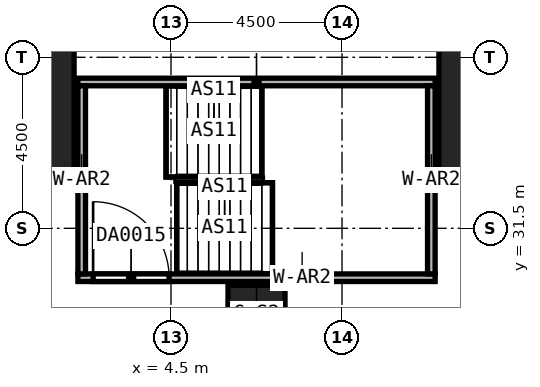
"""IFC4 building model, lengths in metres.
Left out: names, types, materials, properties, quantities, classifications, styles, units other than length and angle.
Written with IfcOpenShell. Run it as: python <this file> out.ifc"""

import sys

from ifc_helpers import new_model, si_unit, direction, frame, frame_2d, origin, origin_2d, place, context, subcontext, project, spatial, rectangle, extrude, element, fill, save


model = new_model("IFC4")
c1 = context("Model", 3, precision=1e-05, world=origin(), true_north=direction((0.0, 1.0)))
c2 = subcontext(c1, "Body", "Model", "MODEL_VIEW")
j1 = project(units=[si_unit("LENGTHUNIT", "METRE"), si_unit("PLANEANGLEUNIT", "RADIAN")], contexts=[c1])
p1 = place(None, origin())
s1 = spatial("IfcSite", under=j1, at=p1, CompositionType="ELEMENT")
p2 = place(p1, origin())
s2 = spatial("IfcBuilding", under=s1, at=p2, CompositionType="ELEMENT")
p3 = place(p2, frame((0.0, 0.0, 19.0)))
s3 = spatial("IfcBuildingStorey", under=s2, at=p3, CompositionType="ELEMENT", Elevation=19.0)
for number, where, z_axis, x_axis in (
    (1, (0.0, 35.85, 0.0), (0.0, 0.0, 1.0), (1.0, 0.0, 0.0)),
    (2, (13.5, 35.85, 0.0), (0.0, 0.0, 1.0), (1.0, 0.0, 0.0)),
):
    element("IfcColumn", number, at=place(p3, frame(where, z_axis=z_axis, x_axis=x_axis)), inside=s3, PredefinedType="COLUMN", context=c2, shape_type="SweptSolid", body=[
        extrude(rectangle(XDim=3.9, YDim=6.3, at=origin_2d()), origin(), (0.0, 0.0, 1.0), 6.0),
    ])
p4 = place(p3, frame((6.75, 29.25, 0.0), z_axis=(0.0, 0.0, 1.0), x_axis=(1.0, 0.0, 0.0)))
e3 = element("IfcColumn", 3, at=p4, inside=s3, PredefinedType="COLUMN", context=c2, shape_type="SweptSolid", body=[
    extrude(rectangle(XDim=1.5, YDim=1.5, at=origin_2d()), origin(), (0.0, 0.0, 1.0), 6.0),
])
p5 = place(p3, frame((2.05, 30.2, 0.0), z_axis=(0.0, 0.0, 1.0), x_axis=(1.0, 0.0, 0.0)))
e4 = element("IfcWall", 4, at=p5, inside=s3, PredefinedType="SOLIDWALL", context=c2, shape_type="SweptSolid", body=[
    extrude(rectangle(XDim=9.4, YDim=0.2, at=frame_2d((4.7, 0.0))), origin(), (0.0, 0.0, 1.0), 6.0),
])
p6 = place(p5, frame((0.4, 0.0, 0.0)))
e5 = element("IfcOpeningElement", 5, at=p6, cuts=e4, PredefinedType="OPENING", context=c2, shape_type="SweptSolid", body=[
    extrude(rectangle(XDim=2.0, YDim=2.4, at=frame_2d((1.0, 1.2))), frame((0.0, 0.1, 0.0), z_axis=(0.0, -1.0, 0.0), x_axis=(1.0, 0.0, 0.0)), (0.0, 0.0, 1.0), 0.2),
])
p7 = place(p3, frame((2.05, 35.35, 0.0), z_axis=(0.0, 0.0, 1.0), x_axis=(1.0, 0.0, 0.0)))
e6 = element("IfcWall", 6, at=p7, inside=s3, PredefinedType="SOLIDWALL", context=c2, shape_type="SweptSolid", body=[
    extrude(rectangle(XDim=9.4, YDim=0.2, at=frame_2d((4.7, 0.0))), origin(), (0.0, 0.0, 1.0), 6.0),
])
for number, where, z_axis, x_axis in (
    (7, (2.15, 30.3, 0.0), (0.0, 0.0, 1.0), (0.0, 1.0, 0.0)),
    (8, (11.35, 30.3, 0.0), (0.0, 0.0, 1.0), (0.0, 1.0, 0.0)),
):
    element("IfcWall", number, at=place(p3, frame(where, z_axis=z_axis, x_axis=x_axis)), inside=s3, PredefinedType="SOLIDWALL", context=c2, shape_type="SweptSolid", body=[
        extrude(rectangle(XDim=4.95, YDim=0.2, at=frame_2d((2.475, 0.0))), origin(), (0.0, 0.0, 1.0), 6.0),
    ])
p8 = place(p6, origin())
e9 = element("IfcDoor", 9, at=p8, inside=s3, OperationType="DOUBLE_DOOR_SINGLE_SWING", PredefinedType="DOOR", context=c2, shape_type="SweptSolid", body=[
    extrude(rectangle(XDim=2.0, YDim=2.4, at=frame_2d((1.0, 1.2))), frame((0.0, 0.025, 0.0), z_axis=(0.0, -1.0, 0.0), x_axis=(1.0, 0.0, 0.0)), (0.0, 0.0, 1.0), 0.05),
])
fill(e5, e9)
save(model, sys.argv[1])
